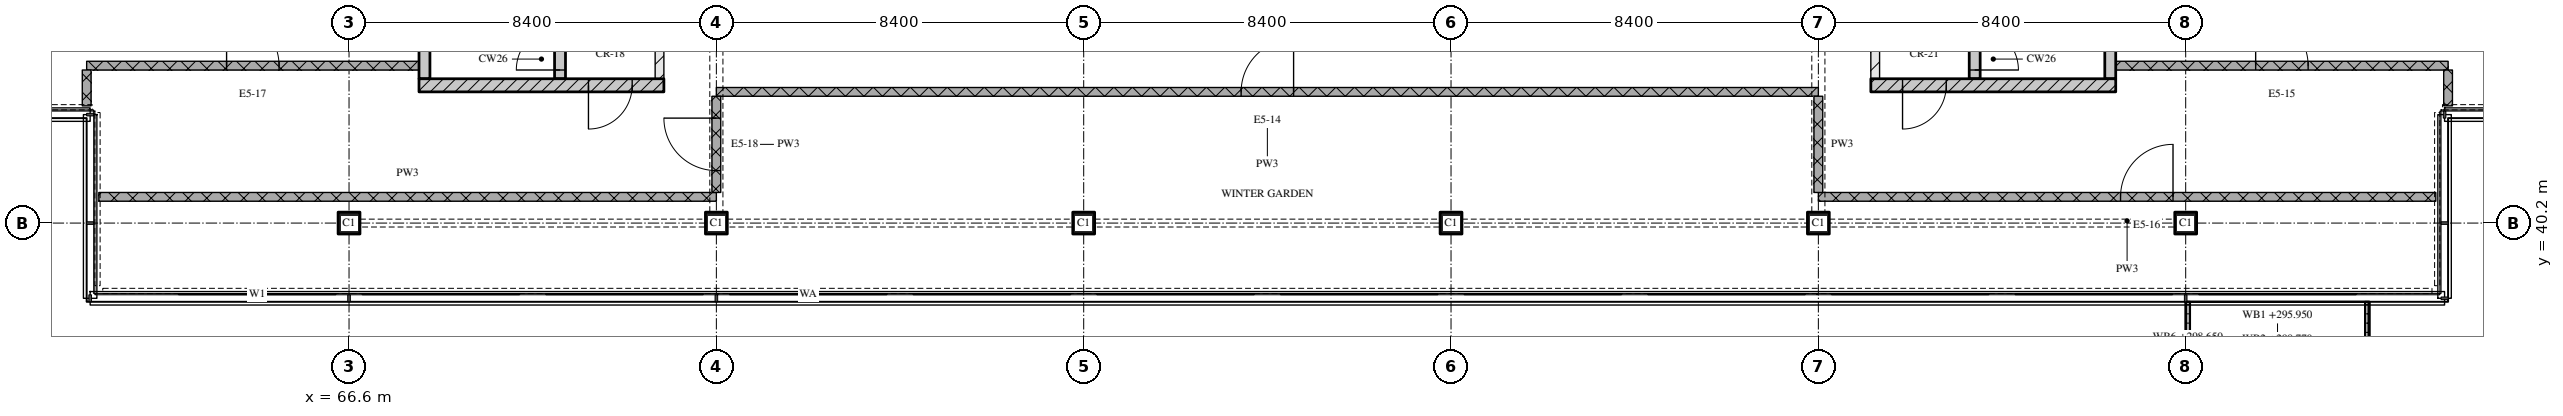
"""IFC4 building model, lengths in metres.
Left out: names, types, materials, properties, quantities, classifications, styles, units other than length and angle.
Written with IfcOpenShell. Run it as: python <this file> out.ifc"""

import sys

from ifc_helpers import new_model, si_unit, direction, frame, frame_2d, origin, origin_2d, place, context, subcontext, project, spatial, polyline, rectangle, outline, extrude, element, fill, save


model = new_model("IFC4")
c1 = context("Model", 3, precision=1e-05, world=origin(), true_north=direction((0.0, 1.0)))
c2 = subcontext(c1, "Body", "Model", "MODEL_VIEW")
j1 = project(units=[si_unit("LENGTHUNIT", "METRE"), si_unit("PLANEANGLEUNIT", "RADIAN")], contexts=[c1])
p1 = place(None, origin())
s1 = spatial("IfcSite", under=j1, at=p1, CompositionType="ELEMENT")
p2 = place(p1, origin())
s2 = spatial("IfcBuilding", under=s1, at=p2, CompositionType="ELEMENT")
p3 = place(p2, frame((0.0, 0.0, 295.95)))
s3 = spatial("IfcBuildingStorey", under=s2, at=p3, CompositionType="ELEMENT", Elevation=295.95)
for number, where, z_axis, x_axis in (
    (1, (66.6, 40.2, 0.0), (0.0, 0.0, 1.0), (1.0, 0.0, 0.0)),
    (2, (75.0, 40.2, 0.0), (0.0, 0.0, 1.0), (1.0, 0.0, 0.0)),
    (3, (83.4, 40.2, 0.0), (0.0, 0.0, 1.0), (1.0, 0.0, 0.0)),
    (4, (91.8, 40.2, 0.0), (0.0, 0.0, 1.0), (1.0, 0.0, 0.0)),
    (5, (100.2, 40.2, 0.0), (0.0, 0.0, 1.0), (1.0, 0.0, 0.0)),
    (6, (108.6, 40.2, 0.0), (0.0, 0.0, 1.0), (1.0, 0.0, 0.0)),
):
    element("IfcColumn", number, at=place(p3, frame(where, z_axis=z_axis, x_axis=x_axis)), inside=s3, PredefinedType="COLUMN", context=c2, shape_type="SweptSolid", body=[
        extrude(rectangle(XDim=0.5, YDim=0.5, at=origin_2d()), origin(), (0.0, 0.0, 1.0), 3.6),
    ])
p4 = place(p3, origin())
e7 = element("IfcWall", 7, at=p4, inside=s3, PredefinedType="SOLIDWALL", context=c2, shape_type="SweptSolid", body=[
    extrude(outline(polyline([(108.6, 38.4), (108.7, 38.4), (108.7, 36.767), (112.7, 36.767), (112.7, 38.4), (112.8, 38.4), (112.8, 36.667), (108.6, 36.667), (108.6, 38.4)])), origin(), (0.0, 0.0, 1.0), 1.0),
])
p5 = place(p3, frame((68.2, 43.35, 0.0), z_axis=(0.0, 0.0, 1.0), x_axis=(1.0, 0.0, 0.0)))
e8 = element("IfcWall", 8, at=p5, inside=s3, PredefinedType="SOLIDWALL", context=c2, shape_type="SweptSolid", body=[
    extrude(rectangle(XDim=5.6, YDim=0.3, at=frame_2d((2.8, 0.0))), origin(), (0.0, 0.0, 1.0), 3.32),
])
p6 = place(p5, frame((3.875, 0.0, 0.0)))
e9 = element("IfcOpeningElement", 9, at=p6, cuts=e8, PredefinedType="OPENING", context=c2, shape_type="SweptSolid", body=[
    extrude(rectangle(XDim=1.0, YDim=2.1, at=frame_2d((0.5, 1.05))), frame((0.0, 0.16, 0.0), z_axis=(0.0, -1.0, 0.0), x_axis=(1.0, 0.0, 0.0)), (0.0, 0.0, 1.0), 0.32),
])
p7 = place(p3, frame((68.325, 43.5, 0.0), z_axis=(0.0, 0.0, 1.0), x_axis=(0.0, 1.0, 0.0)))
e10 = element("IfcWall", 10, at=p7, inside=s3, PredefinedType="SOLIDWALL", context=c2, shape_type="SweptSolid", body=[
    extrude(rectangle(XDim=6.9, YDim=0.25, at=frame_2d((3.45, 0.0))), origin(), (0.0, 0.0, 1.0), 3.32),
])
p8 = place(p3, frame((71.425, 43.5, 0.0), z_axis=(0.0, 0.0, 1.0), x_axis=(0.0, 1.0, 0.0)))
e11 = element("IfcWall", 11, at=p8, inside=s3, PredefinedType="SOLIDWALL", context=c2, shape_type="SweptSolid", body=[
    extrude(rectangle(XDim=6.9, YDim=0.25, at=frame_2d((3.45, 0.0))), origin(), (0.0, 0.0, 1.0), 3.32),
])
p9 = place(p8, frame((0.2, 0.0, 0.0)))
e12 = element("IfcOpeningElement", 12, at=p9, cuts=e11, PredefinedType="OPENING", context=c2, shape_type="SweptSolid", body=[
    extrude(rectangle(XDim=1.0, YDim=2.1, at=frame_2d((0.5, 1.05))), frame((0.0, 0.135, 0.0), z_axis=(0.0, -1.0, 0.0), x_axis=(1.0, 0.0, 0.0)), (0.0, 0.0, 1.0), 0.27),
])
p10 = place(p3, frame((73.7, 43.5, 0.0), z_axis=(0.0, 0.0, 1.0), x_axis=(0.0, 1.0, 0.0)))
e13 = element("IfcWall", 13, at=p10, inside=s3, PredefinedType="PARTITIONING", context=c2, shape_type="SweptSolid", body=[
    extrude(rectangle(XDim=6.9, YDim=0.2, at=frame_2d((3.45, 0.0))), origin(), (0.0, 0.0, 1.0), 3.32),
])
p11 = place(p10, frame((1.0, 0.0, 0.0)))
e14 = element("IfcOpeningElement", 14, at=p11, cuts=e13, PredefinedType="OPENING", context=c2, shape_type="SweptSolid", body=[
    extrude(rectangle(XDim=1.0, YDim=2.1, at=frame_2d((0.5, 1.05))), frame((0.0, 0.11, 0.0), z_axis=(0.0, -1.0, 0.0), x_axis=(1.0, 0.0, 0.0)), (0.0, 0.0, 1.0), 0.22),
])
p12 = place(p3, frame((101.4, 43.35, 0.0), z_axis=(0.0, 0.0, 1.0), x_axis=(1.0, 0.0, 0.0)))
e15 = element("IfcWall", 15, at=p12, inside=s3, PredefinedType="SOLIDWALL", context=c2, shape_type="SweptSolid", body=[
    extrude(rectangle(XDim=5.6, YDim=0.3, at=frame_2d((2.8, 0.0))), origin(), (0.0, 0.0, 1.0), 3.32),
])
p13 = place(p12, frame((0.725, 0.0, 0.0)))
e16 = element("IfcOpeningElement", 16, at=p13, cuts=e15, PredefinedType="OPENING", context=c2, shape_type="SweptSolid", body=[
    extrude(rectangle(XDim=1.0, YDim=2.1, at=frame_2d((0.5, 1.05))), frame((0.0, 0.16, 0.0), z_axis=(0.0, -1.0, 0.0), x_axis=(1.0, 0.0, 0.0)), (0.0, 0.0, 1.0), 0.32),
])
p14 = place(p3, frame((101.5, 43.5, 0.0), z_axis=(0.0, 0.0, 1.0), x_axis=(0.0, 1.0, 0.0)))
e17 = element("IfcWall", 17, at=p14, inside=s3, PredefinedType="PARTITIONING", context=c2, shape_type="SweptSolid", body=[
    extrude(rectangle(XDim=6.9, YDim=0.2, at=frame_2d((3.45, 0.0))), origin(), (0.0, 0.0, 1.0), 3.32),
])
p15 = place(p14, frame((1.0, 0.0, 0.0)))
e18 = element("IfcOpeningElement", 18, at=p15, cuts=e17, PredefinedType="OPENING", context=c2, shape_type="SweptSolid", body=[
    extrude(rectangle(XDim=1.0, YDim=2.1, at=frame_2d((0.5, 1.05))), frame((0.0, 0.11, 0.0), z_axis=(0.0, -1.0, 0.0), x_axis=(1.0, 0.0, 0.0)), (0.0, 0.0, 1.0), 0.22),
])
p16 = place(p3, frame((103.775, 43.5, 0.0), z_axis=(0.0, 0.0, 1.0), x_axis=(0.0, 1.0, 0.0)))
e19 = element("IfcWall", 19, at=p16, inside=s3, PredefinedType="SOLIDWALL", context=c2, shape_type="SweptSolid", body=[
    extrude(rectangle(XDim=6.9, YDim=0.25, at=frame_2d((3.45, 0.0))), origin(), (0.0, 0.0, 1.0), 3.32),
])
p17 = place(p16, frame((0.2, 0.0, 0.0)))
e20 = element("IfcOpeningElement", 20, at=p17, cuts=e19, PredefinedType="OPENING", context=c2, shape_type="SweptSolid", body=[
    extrude(rectangle(XDim=1.0, YDim=2.1, at=frame_2d((0.5, 1.05))), frame((0.0, 0.135, 0.0), z_axis=(0.0, -1.0, 0.0), x_axis=(1.0, 0.0, 0.0)), (0.0, 0.0, 1.0), 0.27),
])
p18 = place(p3, frame((106.875, 43.5, 0.0), z_axis=(0.0, 0.0, 1.0), x_axis=(0.0, 1.0, 0.0)))
e21 = element("IfcWall", 21, at=p18, inside=s3, PredefinedType="SOLIDWALL", context=c2, shape_type="SweptSolid", body=[
    extrude(rectangle(XDim=6.9, YDim=0.25, at=frame_2d((3.45, 0.0))), origin(), (0.0, 0.0, 1.0), 3.32),
])
p19 = place(p3, frame((60.88, 40.8, 0.0), z_axis=(0.0, 0.0, 1.0), x_axis=(1.0, 0.0, 0.0)))
e22 = element("IfcWall", 22, at=p19, inside=s3, PredefinedType="PARTITIONING", context=c2, shape_type="SweptSolid", body=[
    extrude(rectangle(XDim=14.12, YDim=0.2, at=frame_2d((7.06, 0.0))), origin(), (0.0, 0.0, 1.0), 3.32),
])
p20 = place(p3, frame((114.32, 40.8, 0.0), z_axis=(0.0, 0.0, 1.0), x_axis=(-1.0, 0.0, 0.0)))
e23 = element("IfcWall", 23, at=p20, inside=s3, PredefinedType="PARTITIONING", context=c2, shape_type="SweptSolid", body=[
    extrude(rectangle(XDim=14.12, YDim=0.2, at=frame_2d((7.06, 0.0))), origin(), (0.0, 0.0, 1.0), 3.32),
])
p21 = place(p20, frame((6.01, 0.0, 0.0)))
e24 = element("IfcOpeningElement", 24, at=p21, cuts=e23, PredefinedType="OPENING", context=c2, shape_type="SweptSolid", body=[
    extrude(rectangle(XDim=1.2, YDim=2.1, at=frame_2d((0.6, 1.05))), frame((0.0, 0.11, 0.0), z_axis=(0.0, -1.0, 0.0), x_axis=(1.0, 0.0, 0.0)), (0.0, 0.0, 1.0), 0.22),
])
p22 = place(p3, frame((100.2, 43.2, 0.0), z_axis=(0.0, 0.0, 1.0), x_axis=(-1.0, 0.0, 0.0)))
e25 = element("IfcWall", 25, at=p22, inside=s3, PredefinedType="PARTITIONING", context=c2, shape_type="SweptSolid", body=[
    extrude(rectangle(XDim=25.2, YDim=0.2, at=frame_2d((12.6, 0.0))), origin(), (0.0, 0.0, 1.0), 3.32),
])
p23 = place(p22, frame((12.0, 0.0, 0.0)))
e26 = element("IfcOpeningElement", 26, at=p23, cuts=e25, PredefinedType="OPENING", context=c2, shape_type="SweptSolid", body=[
    extrude(rectangle(XDim=1.2, YDim=2.1, at=frame_2d((0.6, 1.05))), frame((0.0, 0.11, 0.0), z_axis=(0.0, -1.0, 0.0), x_axis=(1.0, 0.0, 0.0)), (0.0, 0.0, 1.0), 0.22),
])
p24 = place(p3, frame((60.6, 43.8, 0.0), z_axis=(0.0, 0.0, 1.0), x_axis=(1.0, 0.0, 0.0)))
e27 = element("IfcWall", 27, at=p24, inside=s3, PredefinedType="PARTITIONING", context=c2, shape_type="SweptSolid", body=[
    extrude(rectangle(XDim=7.6, YDim=0.2, at=frame_2d((3.8, 0.0))), origin(), (0.0, 0.0, 1.0), 3.32),
])
p25 = place(p24, frame((3.2, 0.0, 0.0)))
e28 = element("IfcOpeningElement", 28, at=p25, cuts=e27, PredefinedType="OPENING", context=c2, shape_type="SweptSolid", body=[
    extrude(rectangle(XDim=1.2, YDim=2.1, at=frame_2d((0.6, 1.05))), frame((0.0, 0.11, 0.0), z_axis=(0.0, -1.0, 0.0), x_axis=(1.0, 0.0, 0.0)), (0.0, 0.0, 1.0), 0.22),
])
p26 = place(p3, frame((107.0, 43.8, 0.0), z_axis=(0.0, 0.0, 1.0), x_axis=(1.0, 0.0, 0.0)))
e29 = element("IfcWall", 29, at=p26, inside=s3, PredefinedType="PARTITIONING", context=c2, shape_type="SweptSolid", body=[
    extrude(rectangle(XDim=7.6, YDim=0.2, at=frame_2d((3.8, 0.0))), origin(), (0.0, 0.0, 1.0), 3.32),
])
p27 = place(p26, frame((3.2, 0.0, 0.0)))
e30 = element("IfcOpeningElement", 30, at=p27, cuts=e29, PredefinedType="OPENING", context=c2, shape_type="SweptSolid", body=[
    extrude(rectangle(XDim=1.2, YDim=2.1, at=frame_2d((0.6, 1.05))), frame((0.0, 0.11, 0.0), z_axis=(0.0, -1.0, 0.0), x_axis=(1.0, 0.0, 0.0)), (0.0, 0.0, 1.0), 0.22),
])
p28 = place(p3, frame((60.6, 43.7, 0.0), z_axis=(0.0, 0.0, 1.0), x_axis=(0.0, -1.0, 0.0)))
e31 = element("IfcWall", 31, at=p28, inside=s3, PredefinedType="PARTITIONING", context=c2, shape_type="SweptSolid", body=[
    extrude(rectangle(XDim=0.82, YDim=0.2, at=frame_2d((0.41, 0.0))), origin(), (0.0, 0.0, 1.0), 3.32),
])
p29 = place(p3, frame((75.0, 43.1, 0.0), z_axis=(0.0, 0.0, 1.0), x_axis=(0.0, -1.0, 0.0)))
e32 = element("IfcWall", 32, at=p29, inside=s3, PredefinedType="PARTITIONING", context=c2, shape_type="SweptSolid", body=[
    extrude(rectangle(XDim=2.2, YDim=0.2, at=frame_2d((1.1, 0.0))), origin(), (0.0, 0.0, 1.0), 2.53),
])
p30 = place(p29, frame((0.5, 0.0, 0.0)))
e33 = element("IfcOpeningElement", 33, at=p30, cuts=e32, PredefinedType="OPENING", context=c2, shape_type="SweptSolid", body=[
    extrude(rectangle(XDim=1.2, YDim=2.1, at=frame_2d((0.6, 1.05))), frame((0.0, 0.11, 0.0), z_axis=(0.0, -1.0, 0.0), x_axis=(1.0, 0.0, 0.0)), (0.0, 0.0, 1.0), 0.22),
])
p31 = place(p3, frame((100.2, 43.1, 0.0), z_axis=(0.0, 0.0, 1.0), x_axis=(0.0, -1.0, 0.0)))
e34 = element("IfcWall", 34, at=p31, inside=s3, PredefinedType="PARTITIONING", context=c2, shape_type="SweptSolid", body=[
    extrude(rectangle(XDim=2.2, YDim=0.2, at=frame_2d((1.1, 0.0))), origin(), (0.0, 0.0, 1.0), 2.53),
])
p32 = place(p3, frame((114.6, 43.7, 0.0), z_axis=(0.0, 0.0, 1.0), x_axis=(0.0, -1.0, 0.0)))
e35 = element("IfcWall", 35, at=p32, inside=s3, PredefinedType="PARTITIONING", context=c2, shape_type="SweptSolid", body=[
    extrude(rectangle(XDim=0.82, YDim=0.2, at=frame_2d((0.41, 0.0))), origin(), (0.0, 0.0, 1.0), 3.32),
])
p33 = place(p6, origin())
e36 = element("IfcDoor", 36, at=p33, inside=s3, OperationType="SINGLE_SWING_RIGHT", PredefinedType="DOOR", context=c2, shape_type="SweptSolid", body=[
    extrude(rectangle(XDim=1.0, YDim=2.1, at=frame_2d((0.5, 1.05))), frame((0.0, 0.025, 0.0), z_axis=(0.0, -1.0, 0.0), x_axis=(1.0, 0.0, 0.0)), (0.0, 0.0, 1.0), 0.05),
])
fill(e9, e36)
p34 = place(p9, origin())
e37 = element("IfcDoor", 37, at=p34, inside=s3, OperationType="SINGLE_SWING_LEFT", PredefinedType="DOOR", context=c2, shape_type="SweptSolid", body=[
    extrude(rectangle(XDim=1.0, YDim=2.1, at=frame_2d((0.5, 1.05))), frame((0.0, 0.025, 0.0), z_axis=(0.0, -1.0, 0.0), x_axis=(1.0, 0.0, 0.0)), (0.0, 0.0, 1.0), 0.05),
])
fill(e12, e37)
p35 = place(p13, origin())
e38 = element("IfcDoor", 38, at=p35, inside=s3, OperationType="SINGLE_SWING_RIGHT", PredefinedType="DOOR", context=c2, shape_type="SweptSolid", body=[
    extrude(rectangle(XDim=1.0, YDim=2.1, at=frame_2d((0.5, 1.05))), frame((0.0, 0.025, 0.0), z_axis=(0.0, -1.0, 0.0), x_axis=(1.0, 0.0, 0.0)), (0.0, 0.0, 1.0), 0.05),
])
fill(e16, e38)
p36 = place(p17, origin())
e39 = element("IfcDoor", 39, at=p36, inside=s3, OperationType="SINGLE_SWING_RIGHT", PredefinedType="DOOR", context=c2, shape_type="SweptSolid", body=[
    extrude(rectangle(XDim=1.0, YDim=2.1, at=frame_2d((0.5, 1.05))), frame((0.0, 0.025, 0.0), z_axis=(0.0, -1.0, 0.0), x_axis=(1.0, 0.0, 0.0)), (0.0, 0.0, 1.0), 0.05),
])
fill(e20, e39)
p37 = place(p21, origin())
e40 = element("IfcDoor", 40, at=p37, inside=s3, OperationType="SINGLE_SWING_RIGHT", PredefinedType="DOOR", context=c2, shape_type="SweptSolid", body=[
    extrude(rectangle(XDim=1.2, YDim=2.1, at=frame_2d((0.6, 1.05))), frame((0.0, 0.025, 0.0), z_axis=(0.0, -1.0, 0.0), x_axis=(1.0, 0.0, 0.0)), (0.0, 0.0, 1.0), 0.05),
])
fill(e24, e40)
p38 = place(p23, origin())
e41 = element("IfcDoor", 41, at=p38, inside=s3, OperationType="SINGLE_SWING_RIGHT", PredefinedType="DOOR", context=c2, shape_type="SweptSolid", body=[
    extrude(rectangle(XDim=1.2, YDim=2.1, at=frame_2d((0.6, 1.05))), frame((0.0, 0.025, 0.0), z_axis=(0.0, -1.0, 0.0), x_axis=(1.0, 0.0, 0.0)), (0.0, 0.0, 1.0), 0.05),
])
fill(e26, e41)
p39 = place(p25, origin())
e42 = element("IfcDoor", 42, at=p39, inside=s3, OperationType="SINGLE_SWING_LEFT", PredefinedType="DOOR", context=c2, shape_type="SweptSolid", body=[
    extrude(rectangle(XDim=1.2, YDim=2.1, at=frame_2d((0.6, 1.05))), frame((0.0, 0.025, 0.0), z_axis=(0.0, -1.0, 0.0), x_axis=(1.0, 0.0, 0.0)), (0.0, 0.0, 1.0), 0.05),
])
fill(e28, e42)
p40 = place(p27, origin())
e43 = element("IfcDoor", 43, at=p40, inside=s3, OperationType="SINGLE_SWING_LEFT", PredefinedType="DOOR", context=c2, shape_type="SweptSolid", body=[
    extrude(rectangle(XDim=1.2, YDim=2.1, at=frame_2d((0.6, 1.05))), frame((0.0, 0.025, 0.0), z_axis=(0.0, -1.0, 0.0), x_axis=(1.0, 0.0, 0.0)), (0.0, 0.0, 1.0), 0.05),
])
fill(e30, e43)
p41 = place(p30, origin())
e44 = element("IfcDoor", 44, at=p41, inside=s3, OperationType="SINGLE_SWING_RIGHT", PredefinedType="DOOR", context=c2, shape_type="SweptSolid", body=[
    extrude(rectangle(XDim=1.2, YDim=2.1, at=frame_2d((0.6, 1.05))), frame((0.0, 0.025, 0.0), z_axis=(0.0, -1.0, 0.0), x_axis=(1.0, 0.0, 0.0)), (0.0, 0.0, 1.0), 0.05),
])
fill(e33, e44)
save(model, sys.argv[1])
